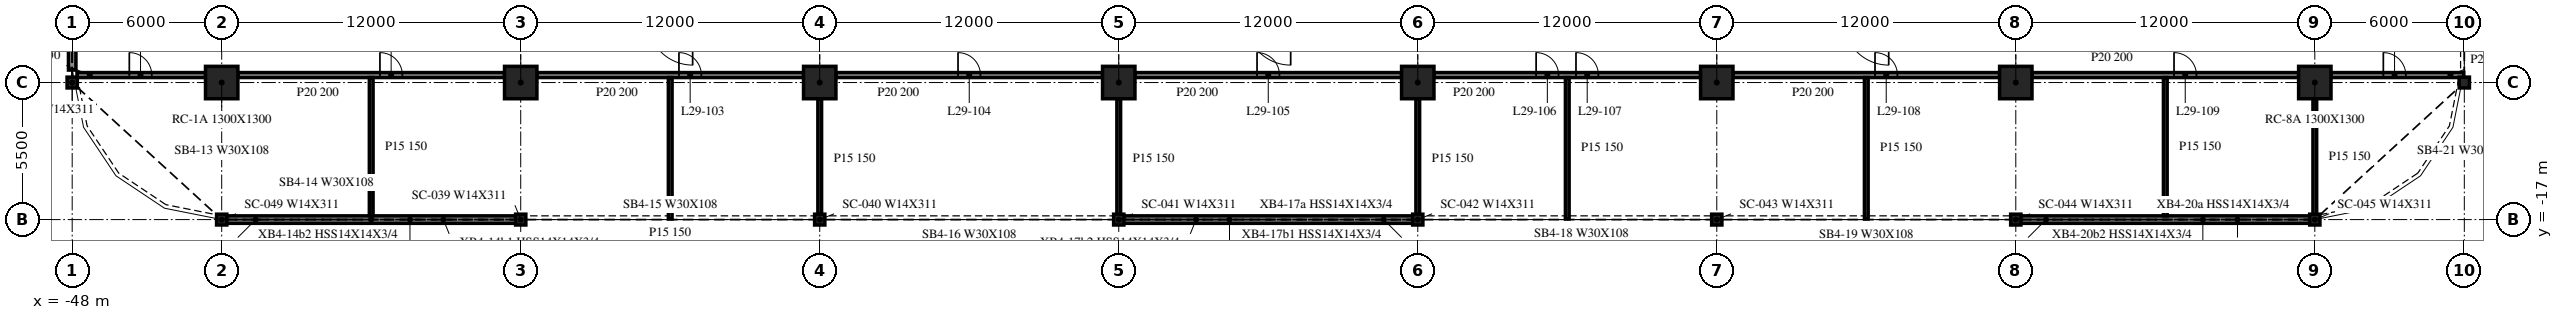
"""IFC4 building model, lengths in metres.
Left out: names, types, materials, properties, quantities, classifications, styles, units other than length and angle.
Written with IfcOpenShell. Run it as: python <this file> out.ifc"""

import sys

from ifc_helpers import new_model, si_unit, direction, frame, frame_2d, origin, origin_2d, place, context, subcontext, project, spatial, rectangle, i_section, extrude, element, fill, save


model = new_model("IFC4")
c1 = context("Model", 3, precision=1e-05, world=origin(), true_north=direction((0.0, 1.0)))
c2 = subcontext(c1, "Body", "Model", "MODEL_VIEW")
j1 = project(units=[si_unit("LENGTHUNIT", "METRE"), si_unit("PLANEANGLEUNIT", "RADIAN")], contexts=[c1])
p1 = place(None, origin())
s1 = spatial("IfcSite", under=j1, at=p1, CompositionType="ELEMENT")
p2 = place(p1, origin())
s2 = spatial("IfcBuilding", under=s1, at=p2, CompositionType="ELEMENT")
p3 = place(p2, frame((0.0, 0.0, 126.1)))
s3 = spatial("IfcBuildingStorey", under=s2, at=p3, CompositionType="ELEMENT", Elevation=126.1)
for number, where, z_axis, x_axis in (
    (1, (-42.0, -11.5, -0.34), (0.0, 0.0, 1.0), (1.0, 0.0, 0.0)),
    (2, (-30.0, -11.5, -0.34), (0.0, 0.0, 1.0), (1.0, 0.0, 0.0)),
    (3, (-18.0, -11.5, -0.34), (0.0, 0.0, 1.0), (1.0, 0.0, 0.0)),
    (4, (-6.0, -11.5, -0.34), (0.0, 0.0, 1.0), (1.0, 0.0, 0.0)),
    (5, (6.0, -11.5, -0.34), (0.0, 0.0, 1.0), (1.0, 0.0, 0.0)),
    (6, (18.0, -11.5, -0.34), (0.0, 0.0, 1.0), (1.0, 0.0, 0.0)),
    (7, (30.0, -11.5, -0.34), (0.0, 0.0, 1.0), (1.0, 0.0, 0.0)),
    (8, (42.0, -11.5, -0.34), (0.0, 0.0, 1.0), (1.0, 0.0, 0.0)),
):
    element("IfcColumn", number, at=place(p3, frame(where, z_axis=z_axis, x_axis=x_axis)), inside=s3, PredefinedType="COLUMN", context=c2, shape_type="SweptSolid", body=[
        extrude(rectangle(XDim=1.3, YDim=1.3, at=origin_2d()), origin(), (0.0, 0.0, 1.0), 4.1),
    ])
for number, where, z_axis, x_axis in (
    (9, (-48.0, -11.5, -0.34), (0.0, 0.0, 1.0), (1.0, 0.0, 0.0)),
    (10, (-42.0, -17.0, -0.34), (0.0, 0.0, 1.0), (1.0, 0.0, 0.0)),
    (11, (-30.0, -17.0, -0.34), (0.0, 0.0, 1.0), (1.0, 0.0, 0.0)),
    (12, (-18.0, -17.0, -0.34), (0.0, 0.0, 1.0), (1.0, 0.0, 0.0)),
    (13, (-6.0, -17.0, -0.34), (0.0, 0.0, 1.0), (1.0, 0.0, 0.0)),
    (14, (6.0, -17.0, -0.34), (0.0, 0.0, 1.0), (1.0, 0.0, 0.0)),
    (15, (18.0, -17.0, -0.34), (0.0, 0.0, 1.0), (1.0, 0.0, 0.0)),
    (16, (30.0, -17.0, -0.34), (0.0, 0.0, 1.0), (1.0, 0.0, 0.0)),
    (17, (42.0, -17.0, -0.34), (0.0, 0.0, 1.0), (1.0, 0.0, 0.0)),
    (18, (48.0, -11.5, -0.34), (0.0, 0.0, 1.0), (1.0, 0.0, 0.0)),
):
    element("IfcColumn", number, at=place(p3, frame(where, z_axis=z_axis, x_axis=x_axis)), inside=s3, PredefinedType="COLUMN", context=c2, shape_type="SweptSolid", body=[
        extrude(i_section(OverallWidth=0.412, OverallDepth=0.434, WebThickness=0.036, FlangeThickness=0.057, at=origin_2d()), origin(), (0.0, 0.0, 1.0), 4.1),
    ])
p4 = place(p3, frame((-48.0, -0.218, 0.0), z_axis=(0.0, 0.0, 1.0), x_axis=(0.0, -1.0, 0.0)))
e19 = element("IfcWall", 19, at=p4, inside=s3, PredefinedType="NOTDEFINED", context=c2, shape_type="SweptSolid", body=[
    extrude(rectangle(XDim=10.782, YDim=0.3, at=frame_2d((5.391, 0.0))), origin(), (0.0, 0.0, 1.0), 3.003),
])
for number, where, z_axis, x_axis in (
    (20, (-41.982, -17.0, 0.0), (0.0, 0.0, 1.0), (1.0, 0.0, 0.0)),
    (21, (-5.982, -17.0, 0.0), (0.0, 0.0, 1.0), (1.0, 0.0, 0.0)),
    (22, (30.018, -17.0, 0.0), (0.0, 0.0, 1.0), (1.0, 0.0, 0.0)),
):
    element("IfcWall", number, at=place(p3, frame(where, z_axis=z_axis, x_axis=x_axis)), inside=s3, PredefinedType="NOTDEFINED", context=c2, shape_type="SweptSolid", body=[
        extrude(rectangle(XDim=11.964, YDim=0.3, at=frame_2d((5.982, 0.0))), origin(), (0.0, 0.0, 1.0), 3.003),
    ])
p5 = place(p3, frame((-47.807, -11.2, 0.0), z_axis=(0.0, 0.0, 1.0), x_axis=(1.0, 0.0, 0.0)))
e23 = element("IfcWall", 23, at=p5, inside=s3, PredefinedType="PARTITIONING", context=c2, shape_type="SweptSolid", body=[
    extrude(rectangle(XDim=5.157, YDim=0.2, at=frame_2d((2.579, 0.0))), origin(), (0.0, 0.0, 1.0), 3.76),
])
p6 = place(p5, frame((2.1, 0.0, 0.0)))
e24 = element("IfcOpeningElement", 24, at=p6, cuts=e23, PredefinedType="OPENING", context=c2, shape_type="SweptSolid", body=[
    extrude(rectangle(XDim=0.9, YDim=2.1, at=frame_2d((0.45, 1.05))), frame((0.0, 0.11, 0.0), z_axis=(0.0, -1.0, 0.0), x_axis=(1.0, 0.0, 0.0)), (0.0, 0.0, 1.0), 0.22),
])
p7 = place(p3, frame((-41.35, -11.2, 0.0), z_axis=(0.0, 0.0, 1.0), x_axis=(1.0, 0.0, 0.0)))
e25 = element("IfcWall", 25, at=p7, inside=s3, PredefinedType="PARTITIONING", context=c2, shape_type="SweptSolid", body=[
    extrude(rectangle(XDim=10.7, YDim=0.2, at=frame_2d((5.35, 0.0))), origin(), (0.0, 0.0, 1.0), 3.76),
])
p8 = place(p7, frame((5.7, 0.0, 0.0)))
e26 = element("IfcOpeningElement", 26, at=p8, cuts=e25, PredefinedType="OPENING", context=c2, shape_type="SweptSolid", body=[
    extrude(rectangle(XDim=0.9, YDim=2.1, at=frame_2d((0.45, 1.05))), frame((0.0, 0.11, 0.0), z_axis=(0.0, -1.0, 0.0), x_axis=(1.0, 0.0, 0.0)), (0.0, 0.0, 1.0), 0.22),
])
p9 = place(p3, frame((-29.35, -11.2, 0.0), z_axis=(0.0, 0.0, 1.0), x_axis=(1.0, 0.0, 0.0)))
e27 = element("IfcWall", 27, at=p9, inside=s3, PredefinedType="PARTITIONING", context=c2, shape_type="SweptSolid", body=[
    extrude(rectangle(XDim=10.7, YDim=0.2, at=frame_2d((5.35, 0.0))), origin(), (0.0, 0.0, 1.0), 3.76),
])
p10 = place(p9, frame((5.7, 0.0, 0.0)))
e28 = element("IfcOpeningElement", 28, at=p10, cuts=e27, PredefinedType="OPENING", context=c2, shape_type="SweptSolid", body=[
    extrude(rectangle(XDim=0.9, YDim=2.1, at=frame_2d((0.45, 1.05))), frame((0.0, 0.11, 0.0), z_axis=(0.0, -1.0, 0.0), x_axis=(1.0, 0.0, 0.0)), (0.0, 0.0, 1.0), 0.22),
])
p11 = place(p3, frame((-17.35, -11.2, 0.0), z_axis=(0.0, 0.0, 1.0), x_axis=(1.0, 0.0, 0.0)))
e29 = element("IfcWall", 29, at=p11, inside=s3, PredefinedType="PARTITIONING", context=c2, shape_type="SweptSolid", body=[
    extrude(rectangle(XDim=10.7, YDim=0.2, at=frame_2d((5.35, 0.0))), origin(), (0.0, 0.0, 1.0), 3.76),
])
p12 = place(p11, frame((4.9, 0.0, 0.0)))
e30 = element("IfcOpeningElement", 30, at=p12, cuts=e29, PredefinedType="OPENING", context=c2, shape_type="SweptSolid", body=[
    extrude(rectangle(XDim=0.9, YDim=2.1, at=frame_2d((0.45, 1.05))), frame((0.0, 0.11, 0.0), z_axis=(0.0, -1.0, 0.0), x_axis=(1.0, 0.0, 0.0)), (0.0, 0.0, 1.0), 0.22),
])
p13 = place(p3, frame((-5.35, -11.2, 0.0), z_axis=(0.0, 0.0, 1.0), x_axis=(1.0, 0.0, 0.0)))
e31 = element("IfcWall", 31, at=p13, inside=s3, PredefinedType="PARTITIONING", context=c2, shape_type="SweptSolid", body=[
    extrude(rectangle(XDim=10.7, YDim=0.2, at=frame_2d((5.35, 0.0))), origin(), (0.0, 0.0, 1.0), 3.76),
])
p14 = place(p13, frame((4.9, 0.0, 0.0)))
e32 = element("IfcOpeningElement", 32, at=p14, cuts=e31, PredefinedType="OPENING", context=c2, shape_type="SweptSolid", body=[
    extrude(rectangle(XDim=0.9, YDim=2.1, at=frame_2d((0.45, 1.05))), frame((0.0, 0.11, 0.0), z_axis=(0.0, -1.0, 0.0), x_axis=(1.0, 0.0, 0.0)), (0.0, 0.0, 1.0), 0.22),
])
p15 = place(p3, frame((6.65, -11.2, 0.0), z_axis=(0.0, 0.0, 1.0), x_axis=(1.0, 0.0, 0.0)))
e33 = element("IfcWall", 33, at=p15, inside=s3, PredefinedType="PARTITIONING", context=c2, shape_type="SweptSolid", body=[
    extrude(rectangle(XDim=10.7, YDim=0.2, at=frame_2d((5.35, 0.0))), origin(), (0.0, 0.0, 1.0), 3.76),
])
p16 = place(p15, frame((4.1, 0.0, 0.0)))
e34 = element("IfcOpeningElement", 34, at=p16, cuts=e33, PredefinedType="OPENING", context=c2, shape_type="SweptSolid", body=[
    extrude(rectangle(XDim=0.9, YDim=2.1, at=frame_2d((0.45, 1.05))), frame((0.0, 0.11, 0.0), z_axis=(0.0, -1.0, 0.0), x_axis=(1.0, 0.0, 0.0)), (0.0, 0.0, 1.0), 0.22),
])
p17 = place(p15, frame((5.7, 0.0, 0.0)))
e35 = element("IfcOpeningElement", 35, at=p17, cuts=e33, PredefinedType="OPENING", context=c2, shape_type="SweptSolid", body=[
    extrude(rectangle(XDim=0.9, YDim=2.1, at=frame_2d((0.45, 1.05))), frame((0.0, 0.11, 0.0), z_axis=(0.0, -1.0, 0.0), x_axis=(1.0, 0.0, 0.0)), (0.0, 0.0, 1.0), 0.22),
])
p18 = place(p3, frame((18.65, -11.2, 0.0), z_axis=(0.0, 0.0, 1.0), x_axis=(1.0, 0.0, 0.0)))
e36 = element("IfcWall", 36, at=p18, inside=s3, PredefinedType="PARTITIONING", context=c2, shape_type="SweptSolid", body=[
    extrude(rectangle(XDim=10.7, YDim=0.2, at=frame_2d((5.35, 0.0))), origin(), (0.0, 0.0, 1.0), 3.76),
])
p19 = place(p18, frame((5.7, 0.0, 0.0)))
e37 = element("IfcOpeningElement", 37, at=p19, cuts=e36, PredefinedType="OPENING", context=c2, shape_type="SweptSolid", body=[
    extrude(rectangle(XDim=0.9, YDim=2.1, at=frame_2d((0.45, 1.05))), frame((0.0, 0.11, 0.0), z_axis=(0.0, -1.0, 0.0), x_axis=(1.0, 0.0, 0.0)), (0.0, 0.0, 1.0), 0.22),
])
p20 = place(p3, frame((30.65, -11.2, 0.0), z_axis=(0.0, 0.0, 1.0), x_axis=(1.0, 0.0, 0.0)))
e38 = element("IfcWall", 38, at=p20, inside=s3, PredefinedType="PARTITIONING", context=c2, shape_type="SweptSolid", body=[
    extrude(rectangle(XDim=10.7, YDim=0.2, at=frame_2d((5.35, 0.0))), origin(), (0.0, 0.0, 1.0), 3.76),
])
p21 = place(p20, frame((5.7, 0.0, 0.0)))
e39 = element("IfcOpeningElement", 39, at=p21, cuts=e38, PredefinedType="OPENING", context=c2, shape_type="SweptSolid", body=[
    extrude(rectangle(XDim=0.9, YDim=2.1, at=frame_2d((0.45, 1.05))), frame((0.0, 0.11, 0.0), z_axis=(0.0, -1.0, 0.0), x_axis=(1.0, 0.0, 0.0)), (0.0, 0.0, 1.0), 0.22),
])
p22 = place(p3, frame((42.65, -11.2, 0.0), z_axis=(0.0, 0.0, 1.0), x_axis=(1.0, 0.0, 0.0)))
e40 = element("IfcWall", 40, at=p22, inside=s3, PredefinedType="PARTITIONING", context=c2, shape_type="SweptSolid", body=[
    extrude(rectangle(XDim=5.325, YDim=0.2, at=frame_2d((2.663, 0.0))), origin(), (0.0, 0.0, 1.0), 3.76),
])
p23 = place(p22, frame((2.1, 0.0, 0.0)))
e41 = element("IfcOpeningElement", 41, at=p23, cuts=e40, PredefinedType="OPENING", context=c2, shape_type="SweptSolid", body=[
    extrude(rectangle(XDim=0.9, YDim=2.1, at=frame_2d((0.45, 1.05))), frame((0.0, 0.11, 0.0), z_axis=(0.0, -1.0, 0.0), x_axis=(1.0, 0.0, 0.0)), (0.0, 0.0, 1.0), 0.22),
])
p24 = place(p3, frame((-36.0, -16.85, 0.0), z_axis=(0.0, 0.0, 1.0), x_axis=(0.0, 1.0, 0.0)))
e42 = element("IfcWall", 42, at=p24, inside=s3, PredefinedType="PARTITIONING", context=c2, shape_type="SweptSolid", body=[
    extrude(rectangle(XDim=5.55, YDim=0.15, at=frame_2d((2.775, 0.0))), origin(), (0.0, 0.0, 1.0), 3.76),
])
p25 = place(p3, frame((-24.0, -16.975, 0.0), z_axis=(0.0, 0.0, 1.0), x_axis=(0.0, 1.0, 0.0)))
e43 = element("IfcWall", 43, at=p25, inside=s3, PredefinedType="PARTITIONING", context=c2, shape_type="SweptSolid", body=[
    extrude(rectangle(XDim=5.675, YDim=0.15, at=frame_2d((2.837, 0.0))), origin(), (0.0, 0.0, 1.0), 3.76),
])
for number, where, z_axis, x_axis in (
    (44, (-18.0, -16.975, 0.0), (0.0, 0.0, 1.0), (0.0, 1.0, 0.0)),
    (45, (-6.0, -16.975, 0.0), (0.0, 0.0, 1.0), (0.0, 1.0, 0.0)),
    (46, (6.0, -16.975, 0.0), (0.0, 0.0, 1.0), (0.0, 1.0, 0.0)),
):
    element("IfcWall", number, at=place(p3, frame(where, z_axis=z_axis, x_axis=x_axis)), inside=s3, PredefinedType="PARTITIONING", context=c2, shape_type="SweptSolid", body=[
        extrude(rectangle(XDim=4.825, YDim=0.15, at=frame_2d((2.413, 0.0))), origin(), (0.0, 0.0, 1.0), 3.76),
    ])
for number, where, z_axis, x_axis in (
    (47, (12.0, -16.975, 0.0), (0.0, 0.0, 1.0), (0.0, 1.0, 0.0)),
    (48, (24.0, -16.975, 0.0), (0.0, 0.0, 1.0), (0.0, 1.0, 0.0)),
):
    element("IfcWall", number, at=place(p3, frame(where, z_axis=z_axis, x_axis=x_axis)), inside=s3, PredefinedType="PARTITIONING", context=c2, shape_type="SweptSolid", body=[
        extrude(rectangle(XDim=5.675, YDim=0.15, at=frame_2d((2.837, 0.0))), origin(), (0.0, 0.0, 1.0), 3.76),
    ])
p26 = place(p3, frame((36.0, -16.85, 0.0), z_axis=(0.0, 0.0, 1.0), x_axis=(0.0, 1.0, 0.0)))
e49 = element("IfcWall", 49, at=p26, inside=s3, PredefinedType="PARTITIONING", context=c2, shape_type="SweptSolid", body=[
    extrude(rectangle(XDim=5.55, YDim=0.15, at=frame_2d((2.775, 0.0))), origin(), (0.0, 0.0, 1.0), 3.76),
])
p27 = place(p3, frame((42.0, -16.847, 0.0), z_axis=(0.0, 0.0, 1.0), x_axis=(0.0, 1.0, 0.0)))
e50 = element("IfcWall", 50, at=p27, inside=s3, PredefinedType="PARTITIONING", context=c2, shape_type="SweptSolid", body=[
    extrude(rectangle(XDim=4.697, YDim=0.15, at=frame_2d((2.349, 0.0))), origin(), (0.0, 0.0, 1.0), 3.76),
])
p28 = place(p6, origin())
e51 = element("IfcDoor", 51, at=p28, inside=s3, OperationType="SINGLE_SWING_RIGHT", PredefinedType="DOOR", context=c2, shape_type="SweptSolid", body=[
    extrude(rectangle(XDim=0.9, YDim=2.1, at=frame_2d((0.45, 1.05))), frame((0.0, 0.025, 0.0), z_axis=(0.0, -1.0, 0.0), x_axis=(1.0, 0.0, 0.0)), (0.0, 0.0, 1.0), 0.05),
])
fill(e24, e51)
p29 = place(p8, origin())
e52 = element("IfcDoor", 52, at=p29, inside=s3, OperationType="SINGLE_SWING_LEFT", PredefinedType="DOOR", context=c2, shape_type="SweptSolid", body=[
    extrude(rectangle(XDim=0.9, YDim=2.1, at=frame_2d((0.45, 1.05))), frame((0.0, 0.025, 0.0), z_axis=(0.0, -1.0, 0.0), x_axis=(1.0, 0.0, 0.0)), (0.0, 0.0, 1.0), 0.05),
])
fill(e26, e52)
p30 = place(p10, origin())
e53 = element("IfcDoor", 53, at=p30, inside=s3, OperationType="SINGLE_SWING_LEFT", PredefinedType="DOOR", context=c2, shape_type="SweptSolid", body=[
    extrude(rectangle(XDim=0.9, YDim=2.1, at=frame_2d((0.45, 1.05))), frame((0.0, 0.025, 0.0), z_axis=(0.0, -1.0, 0.0), x_axis=(1.0, 0.0, 0.0)), (0.0, 0.0, 1.0), 0.05),
])
fill(e28, e53)
p31 = place(p12, origin())
e54 = element("IfcDoor", 54, at=p31, inside=s3, OperationType="SINGLE_SWING_LEFT", PredefinedType="DOOR", context=c2, shape_type="SweptSolid", body=[
    extrude(rectangle(XDim=0.9, YDim=2.1, at=frame_2d((0.45, 1.05))), frame((0.0, 0.025, 0.0), z_axis=(0.0, -1.0, 0.0), x_axis=(1.0, 0.0, 0.0)), (0.0, 0.0, 1.0), 0.05),
])
fill(e30, e54)
p32 = place(p14, origin())
e55 = element("IfcDoor", 55, at=p32, inside=s3, OperationType="SINGLE_SWING_LEFT", PredefinedType="DOOR", context=c2, shape_type="SweptSolid", body=[
    extrude(rectangle(XDim=0.9, YDim=2.1, at=frame_2d((0.45, 1.05))), frame((0.0, 0.025, 0.0), z_axis=(0.0, -1.0, 0.0), x_axis=(1.0, 0.0, 0.0)), (0.0, 0.0, 1.0), 0.05),
])
fill(e32, e55)
p33 = place(p16, origin())
e56 = element("IfcDoor", 56, at=p33, inside=s3, OperationType="SINGLE_SWING_RIGHT", PredefinedType="DOOR", context=c2, shape_type="SweptSolid", body=[
    extrude(rectangle(XDim=0.9, YDim=2.1, at=frame_2d((0.45, 1.05))), frame((0.0, 0.025, 0.0), z_axis=(0.0, -1.0, 0.0), x_axis=(1.0, 0.0, 0.0)), (0.0, 0.0, 1.0), 0.05),
])
fill(e34, e56)
p34 = place(p17, origin())
e57 = element("IfcDoor", 57, at=p34, inside=s3, OperationType="SINGLE_SWING_LEFT", PredefinedType="DOOR", context=c2, shape_type="SweptSolid", body=[
    extrude(rectangle(XDim=0.9, YDim=2.1, at=frame_2d((0.45, 1.05))), frame((0.0, 0.025, 0.0), z_axis=(0.0, -1.0, 0.0), x_axis=(1.0, 0.0, 0.0)), (0.0, 0.0, 1.0), 0.05),
])
fill(e35, e57)
p35 = place(p19, origin())
e58 = element("IfcDoor", 58, at=p35, inside=s3, OperationType="SINGLE_SWING_LEFT", PredefinedType="DOOR", context=c2, shape_type="SweptSolid", body=[
    extrude(rectangle(XDim=0.9, YDim=2.1, at=frame_2d((0.45, 1.05))), frame((0.0, 0.025, 0.0), z_axis=(0.0, -1.0, 0.0), x_axis=(1.0, 0.0, 0.0)), (0.0, 0.0, 1.0), 0.05),
])
fill(e37, e58)
p36 = place(p21, origin())
e59 = element("IfcDoor", 59, at=p36, inside=s3, OperationType="SINGLE_SWING_LEFT", PredefinedType="DOOR", context=c2, shape_type="SweptSolid", body=[
    extrude(rectangle(XDim=0.9, YDim=2.1, at=frame_2d((0.45, 1.05))), frame((0.0, 0.025, 0.0), z_axis=(0.0, -1.0, 0.0), x_axis=(1.0, 0.0, 0.0)), (0.0, 0.0, 1.0), 0.05),
])
fill(e39, e59)
p37 = place(p23, origin())
e60 = element("IfcDoor", 60, at=p37, inside=s3, OperationType="SINGLE_SWING_RIGHT", PredefinedType="DOOR", context=c2, shape_type="SweptSolid", body=[
    extrude(rectangle(XDim=0.9, YDim=2.1, at=frame_2d((0.45, 1.05))), frame((0.0, 0.025, 0.0), z_axis=(0.0, -1.0, 0.0), x_axis=(1.0, 0.0, 0.0)), (0.0, 0.0, 1.0), 0.05),
])
fill(e41, e60)
save(model, sys.argv[1])
